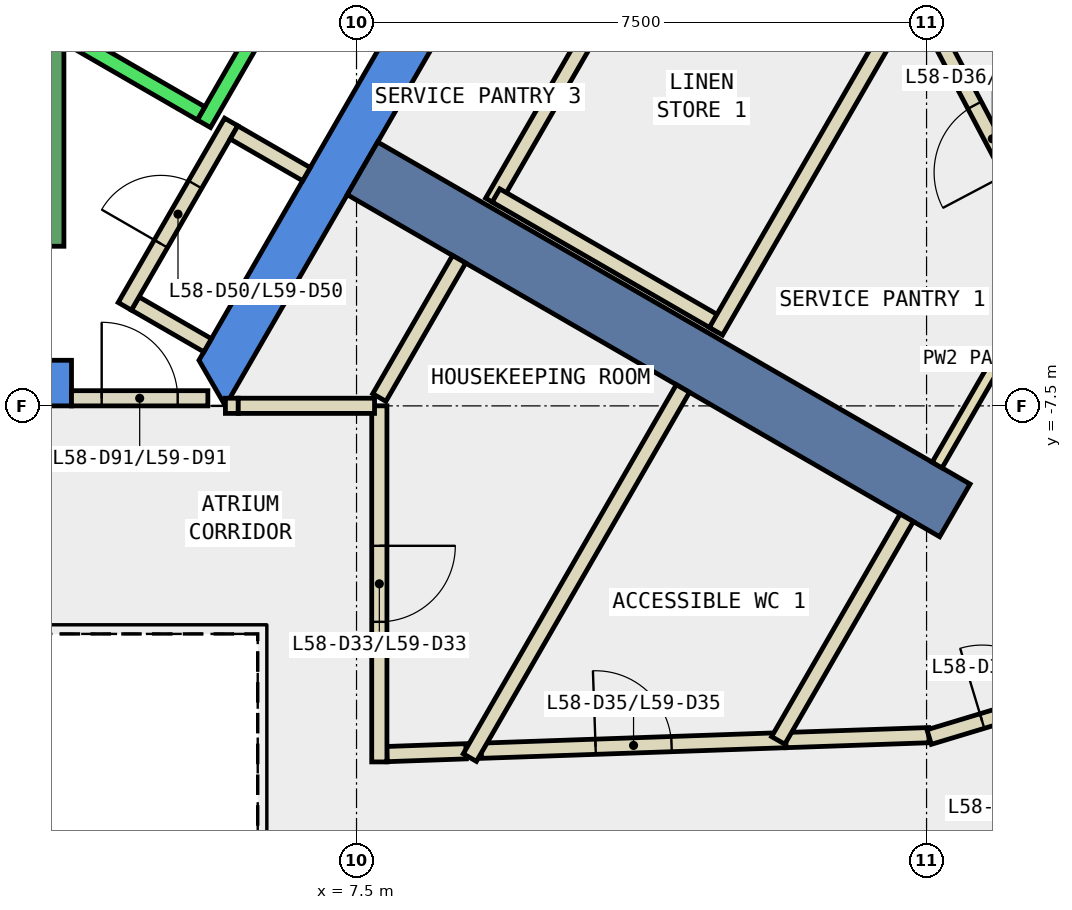
"""IFC4 building model, lengths in metres.
Left out: names, types, materials, properties, quantities, classifications, styles, units other than length and angle.
Written with IfcOpenShell. Run it as: python <this file> out.ifc"""

import sys

from ifc_helpers import new_model, si_unit, direction, frame, frame_2d, origin, place, context, subcontext, project, spatial, polyline, rectangle, outline, extrude, element, fill, save


model = new_model("IFC4")
c1 = context("Model", 3, precision=1e-05, world=origin(), true_north=direction((0.0, 1.0)))
c2 = subcontext(c1, "Body", "Model", "MODEL_VIEW")
j1 = project(units=[si_unit("LENGTHUNIT", "METRE"), si_unit("PLANEANGLEUNIT", "RADIAN")], contexts=[c1])
p1 = place(None, origin())
s1 = spatial("IfcSite", under=j1, at=p1, CompositionType="ELEMENT")
p2 = place(p1, origin())
s2 = spatial("IfcBuilding", under=s1, at=p2, CompositionType="ELEMENT")
p3 = place(p2, frame((0.0, 0.0, 255.8)))
s3 = spatial("IfcBuildingStorey", under=s2, at=p3, CompositionType="ELEMENT", Elevation=255.8)
p4 = place(p3, frame((0.0, 0.0, -0.34)))
e1 = element("IfcWall", 1, at=p4, inside=s3, PredefinedType="SHEAR", context=c2, shape_type="SweptSolid", body=[
    extrude(outline(polyline([(3.75, -7.5), (3.75, -6.9), (-5.427, -6.9), (-5.774, -7.5), (3.75, -7.5)])), origin(), (0.0, 0.0, 1.0), 3.6),
])
p5 = place(p3, frame((0.0, 0.0, -0.34)))
e2 = element("IfcWall", 2, at=p5, inside=s3, PredefinedType="SHEAR", context=c2, shape_type="SweptSolid", body=[
    extrude(outline(polyline([(5.774, -7.5), (11.547, 2.5), (10.854, 2.5), (5.427, -6.9), (5.774, -7.5)])), origin(), (0.0, 0.0, 1.0), 3.6),
])
p6 = place(p3, frame((7.578, -4.375, -0.34), z_axis=(0.0, 0.0, 1.0), x_axis=(0.866024315419, -0.5000018851, 0.0)))
e3 = element("IfcWall", 3, at=p6, inside=s3, PredefinedType="SHEAR", context=c2, shape_type="SweptSolid", body=[
    extrude(rectangle(XDim=9.0, YDim=0.8, at=frame_2d((4.5, 0.0))), origin(), (0.0, 0.0, 1.0), 3.6),
])
p7 = place(p3, frame((7.9, -12.081, 0.0), z_axis=(0.0, 0.0, 1.0), x_axis=(0.999365240621, 0.035624652105, 0.0)))
e4 = element("IfcWall", 4, at=p7, inside=s3, PredefinedType="PARTITIONING", context=c2, shape_type="SweptSolid", body=[
    extrude(rectangle(XDim=1.042, YDim=0.2, at=frame_2d((0.521, 0.0))), origin(), (0.0, 0.0, 1.0), 3.26),
])
p8 = place(p3, frame((9.141, -12.037, 0.0), z_axis=(0.0, 0.0, 1.0), x_axis=(0.999388955878, 0.034953038062, 0.0)))
e5 = element("IfcWall", 5, at=p8, inside=s3, PredefinedType="PARTITIONING", context=c2, shape_type="SweptSolid", body=[
    extrude(rectangle(XDim=4.009, YDim=0.2, at=frame_2d((2.005, 0.0))), origin(), (0.0, 0.0, 1.0), 3.26),
])
p9 = place(p8, frame((1.505, 0.0, 0.0)))
e6 = element("IfcOpeningElement", 6, at=p9, cuts=e5, PredefinedType="OPENING", context=c2, shape_type="SweptSolid", body=[
    extrude(rectangle(XDim=1.0, YDim=2.1, at=frame_2d((0.5, 1.05))), frame((0.0, 0.11, 0.0), z_axis=(0.0, -1.0, 0.0), x_axis=(1.0, 0.0, 0.0)), (0.0, 0.0, 1.0), 0.22),
])
p10 = place(p3, frame((16.667, -5.505, 0.0), z_axis=(0.0, 0.0, 1.0), x_axis=(-0.466812680399, 0.884356218624, 0.0)))
e7 = element("IfcWall", 7, at=p10, inside=s3, PredefinedType="PARTITIONING", context=c2, shape_type="SweptSolid", body=[
    extrude(rectangle(XDim=3.434, YDim=0.2, at=frame_2d((1.717, 0.0))), origin(), (0.0, 0.0, 1.0), 3.26),
])
p11 = place(p10, frame((1.217, 0.0, 0.0)))
e8 = element("IfcOpeningElement", 8, at=p11, cuts=e7, PredefinedType="OPENING", context=c2, shape_type="SweptSolid", body=[
    extrude(rectangle(XDim=1.0, YDim=2.1, at=frame_2d((0.5, 1.05))), frame((0.0, 0.11, 0.0), z_axis=(0.0, -1.0, 0.0), x_axis=(1.0, 0.0, 0.0)), (0.0, 0.0, 1.0), 0.22),
])
p12 = place(p3, frame((13.148, -11.897, 0.0), z_axis=(0.0, 0.0, 1.0), x_axis=(0.999405229262, 0.034484601243, 0.0)))
e9 = element("IfcWall", 9, at=p12, inside=s3, PredefinedType="PARTITIONING", context=c2, shape_type="SweptSolid", body=[
    extrude(rectangle(XDim=1.883, YDim=0.2, at=frame_2d((0.942, 0.0))), origin(), (0.0, 0.0, 1.0), 3.26),
])
p13 = place(p3, frame((15.034, -11.857, 0.0), z_axis=(0.0, 0.0, 1.0), x_axis=(0.957338084933, 0.288970225346, 0.0)))
e10 = element("IfcWall", 10, at=p13, inside=s3, PredefinedType="PARTITIONING", context=c2, shape_type="SweptSolid", body=[
    extrude(rectangle(XDim=2.457, YDim=0.2, at=frame_2d((1.229, 0.0))), origin(), (0.0, 0.0, 1.0), 3.26),
])
p14 = place(p13, frame((0.728, 0.0, 0.0)))
e11 = element("IfcOpeningElement", 11, at=p14, cuts=e10, PredefinedType="OPENING", context=c2, shape_type="SweptSolid", body=[
    extrude(rectangle(XDim=1.0, YDim=2.1, at=frame_2d((0.5, 1.05))), frame((0.0, 0.11, 0.0), z_axis=(0.0, -1.0, 0.0), x_axis=(1.0, 0.0, 0.0)), (0.0, 0.0, 1.0), 0.22),
])
p15 = place(p3, frame((18.427, -12.922, 0.0), z_axis=(0.0, 0.0, 1.0), x_axis=(-0.957336631432, -0.288975040651, 0.0)))
e12 = element("IfcWall", 12, at=p15, inside=s3, PredefinedType="PARTITIONING", context=c2, shape_type="SweptSolid", body=[
    extrude(rectangle(XDim=3.0, YDim=0.2, at=frame_2d((1.5, 0.0))), origin(), (0.0, 0.0, 1.0), 3.26),
])
p16 = place(p15, frame((1.0, 0.0, 0.0)))
e13 = element("IfcOpeningElement", 13, at=p16, cuts=e12, PredefinedType="OPENING", context=c2, shape_type="SweptSolid", body=[
    extrude(rectangle(XDim=1.0, YDim=2.1, at=frame_2d((0.5, 1.05))), frame((0.0, 0.11, 0.0), z_axis=(0.0, -1.0, 0.0), x_axis=(1.0, 0.0, 0.0)), (0.0, 0.0, 1.0), 0.22),
])
p17 = place(p3, frame((5.541, -6.703, 0.0), z_axis=(0.0, 0.0, 1.0), x_axis=(-0.86621513555, 0.499671230855, 0.0)))
e14 = element("IfcWall", 14, at=p17, inside=s3, PredefinedType="PARTITIONING", context=c2, shape_type="SweptSolid", body=[
    extrude(rectangle(XDim=1.1, YDim=0.2, at=frame_2d((0.55, 0.0))), origin(), (0.0, 0.0, 1.0), 3.26),
])
p18 = place(p3, frame((4.451, -6.19, 0.0), z_axis=(0.0, 0.0, 1.0), x_axis=(0.500011755427, 0.866018616679, 0.0)))
e15 = element("IfcWall", 15, at=p18, inside=s3, PredefinedType="PARTITIONING", context=c2, shape_type="SweptSolid", body=[
    extrude(rectangle(XDim=2.8, YDim=0.2, at=frame_2d((1.4, 0.0))), origin(), (0.0, 0.0, 1.0), 3.26),
])
p19 = place(p18, frame((0.95, 0.0, 0.0)))
e16 = element("IfcOpeningElement", 16, at=p19, cuts=e15, PredefinedType="OPENING", context=c2, shape_type="SweptSolid", body=[
    extrude(rectangle(XDim=0.9, YDim=2.1, at=frame_2d((0.45, 1.05))), frame((0.0, 0.11, 0.0), z_axis=(0.0, -1.0, 0.0), x_axis=(1.0, 0.0, 0.0)), (0.0, 0.0, 1.0), 0.22),
])
p20 = place(p3, frame((5.888, -3.902, 0.0), z_axis=(0.0, 0.0, 1.0), x_axis=(0.86621513555, -0.499671230855, 0.0)))
e17 = element("IfcWall", 17, at=p20, inside=s3, PredefinedType="PARTITIONING", context=c2, shape_type="SweptSolid", body=[
    extrude(rectangle(XDim=1.1, YDim=0.2, at=frame_2d((0.55, 0.0))), origin(), (0.0, 0.0, 1.0), 3.26),
])
p21 = place(p3, frame((5.775, -7.499, 0.0), z_axis=(0.0, 0.0, 1.0), x_axis=(1.0, 0.0, 0.0)))
e18 = element("IfcWall", 18, at=p21, inside=s3, PredefinedType="PARTITIONING", context=c2, shape_type="SweptSolid", body=[
    extrude(rectangle(XDim=0.169, YDim=0.2, at=frame_2d((0.084, 0.0))), origin(), (0.0, 0.0, 1.0), 2.4),
])
p22 = place(p3, frame((7.8, -7.39, 0.0), z_axis=(0.0, 0.0, 1.0), x_axis=(0.499977374825, 0.866038466041, 0.0)))
e19 = element("IfcWall", 19, at=p22, inside=s3, PredefinedType="PARTITIONING", context=c2, shape_type="SweptSolid", body=[
    extrude(rectangle(XDim=2.1, YDim=0.2, at=frame_2d((1.05, 0.0))), origin(), (0.0, 0.0, 1.0), 3.26),
])
p23 = place(p3, frame((9.285, -4.818, 0.0), z_axis=(0.0, 0.0, 1.0), x_axis=(0.499962569651, 0.866047013128, 0.0)))
e20 = element("IfcWall", 20, at=p23, inside=s3, PredefinedType="PARTITIONING", context=c2, shape_type="SweptSolid", body=[
    extrude(rectangle(XDim=7.334, YDim=0.2, at=frame_2d((3.667, 0.0))), origin(), (0.0, 0.0, 1.0), 3.26),
])
p24 = place(p3, frame((7.8, -7.499, 0.0), z_axis=(0.0, 0.0, 1.0), x_axis=(0.0, -1.0, 0.0)))
e21 = element("IfcWall", 21, at=p24, inside=s3, PredefinedType="PARTITIONING", context=c2, shape_type="SweptSolid", body=[
    extrude(rectangle(XDim=4.685, YDim=0.2, at=frame_2d((2.343, 0.0))), origin(), (0.0, 0.0, 1.0), 3.26),
])
p25 = place(p24, frame((1.842, 0.0, 0.0)))
e22 = element("IfcOpeningElement", 22, at=p25, cuts=e21, PredefinedType="OPENING", context=c2, shape_type="SweptSolid", body=[
    extrude(rectangle(XDim=1.0, YDim=2.1, at=frame_2d((0.5, 1.05))), frame((0.0, 0.11, 0.0), z_axis=(0.0, -1.0, 0.0), x_axis=(1.0, 0.0, 0.0)), (0.0, 0.0, 1.0), 0.22),
])
p26 = place(p3, frame((9.335, -4.732, 0.0), z_axis=(0.0, 0.0, 1.0), x_axis=(0.866002606077, -0.500039484709, 0.0)))
e23 = element("IfcWall", 23, at=p26, inside=s3, PredefinedType="PARTITIONING", context=c2, shape_type="SweptSolid", body=[
    extrude(rectangle(XDim=3.4, YDim=0.2, at=frame_2d((1.7, 0.0))), origin(), (0.0, 0.0, 1.0), 3.26),
])
p27 = place(p3, frame((11.794, -7.271, 0.0), z_axis=(0.0, 0.0, 1.0), x_axis=(-0.499918457185, -0.866072477433, 0.0)))
e24 = element("IfcWall", 24, at=p27, inside=s3, PredefinedType="PARTITIONING", context=c2, shape_type="SweptSolid", body=[
    extrude(rectangle(XDim=5.607, YDim=0.2, at=frame_2d((2.803, 0.0))), origin(), (0.0, 0.0, 1.0), 3.26),
])
p28 = place(p3, frame((14.871, -1.942, 0.0), z_axis=(0.0, 0.0, 1.0), x_axis=(-0.50000507839, -0.866022471755, 0.0)))
e25 = element("IfcWall", 25, at=p28, inside=s3, PredefinedType="PARTITIONING", context=c2, shape_type="SweptSolid", body=[
    extrude(rectangle(XDim=5.284, YDim=0.2, at=frame_2d((2.642, 0.0))), origin(), (0.0, 0.0, 1.0), 3.26),
])
p29 = place(p3, frame((14.739, -8.972, 0.0), z_axis=(0.0, 0.0, 1.0), x_axis=(-0.499974489635, -0.8660401317, 0.0)))
e26 = element("IfcWall", 26, at=p29, inside=s3, PredefinedType="PARTITIONING", context=c2, shape_type="SweptSolid", body=[
    extrude(rectangle(XDim=3.382, YDim=0.2, at=frame_2d((1.691, 0.0))), origin(), (0.0, 0.0, 1.0), 3.26),
])
p30 = place(p3, frame((16.752, -5.485, 0.0), z_axis=(0.0, 0.0, 1.0), x_axis=(-0.499988848364, -0.866031842089, 0.0)))
e27 = element("IfcWall", 27, at=p30, inside=s3, PredefinedType="PARTITIONING", context=c2, shape_type="SweptSolid", body=[
    extrude(rectangle(XDim=3.226, YDim=0.15, at=frame_2d((1.613, 0.0))), origin(), (0.0, 0.0, 1.0), 3.26),
])
p31 = place(p3, frame((3.75, -7.4, 0.0), z_axis=(0.0, 0.0, 1.0), x_axis=(1.0, 0.0, 0.0)))
e28 = element("IfcWall", 28, at=p31, inside=s3, PredefinedType="PARTITIONING", context=c2, shape_type="SweptSolid", body=[
    extrude(rectangle(XDim=1.794, YDim=0.2, at=frame_2d((0.897, 0.0))), origin(), (0.0, 0.0, 1.0), 2.4),
])
p32 = place(p31, frame((0.397, 0.0, 0.0)))
e29 = element("IfcOpeningElement", 29, at=p32, cuts=e28, PredefinedType="OPENING", context=c2, shape_type="SweptSolid", body=[
    extrude(rectangle(XDim=1.0, YDim=2.1, at=frame_2d((0.5, 1.05))), frame((0.0, 0.11, 0.0), z_axis=(0.0, -1.0, 0.0), x_axis=(1.0, 0.0, 0.0)), (0.0, 0.0, 1.0), 0.22),
])
p33 = place(p3, frame((5.944, -7.499, 0.0), z_axis=(0.0, 0.0, 1.0), x_axis=(1.0, 0.0, 0.0)))
e30 = element("IfcWall", 30, at=p33, inside=s3, PredefinedType="PARTITIONING", context=c2, shape_type="SweptSolid", body=[
    extrude(rectangle(XDim=1.793, YDim=0.2, at=frame_2d((0.896, 0.0))), origin(), (0.0, 0.0, 1.0), 3.26),
])
p34 = place(p3, frame((5.492, -3.788, 0.0), z_axis=(0.0, 0.0, 1.0), x_axis=(0.500034260056, 0.866005622828, 0.0)))
e31 = element("IfcWall", 31, at=p34, inside=s3, PredefinedType="STANDARD", context=c2, shape_type="SweptSolid", body=[
    extrude(rectangle(XDim=5.399, YDim=0.2, at=frame_2d((2.7, 0.0))), origin(), (0.0, 0.0, 1.0), 3.26),
])
p35 = place(p3, frame((3.377, -2.452, 0.0), z_axis=(0.0, 0.0, 1.0), x_axis=(0.865955154139, -0.50012165622, 0.0)))
e32 = element("IfcWall", 32, at=p35, inside=s3, PredefinedType="STANDARD", context=c2, shape_type="SweptSolid", body=[
    extrude(rectangle(XDim=2.4, YDim=0.2, at=frame_2d((1.2, 0.0))), origin(), (0.0, 0.0, 1.0), 3.26),
])
p36 = place(p3, frame((3.55, -2.667, 0.0), z_axis=(0.0, 0.0, 1.0), x_axis=(0.0, -1.0, 0.0)))
e33 = element("IfcWall", 33, at=p36, inside=s3, PredefinedType="STANDARD", context=c2, shape_type="SweptSolid", body=[
    extrude(rectangle(XDim=2.733, YDim=0.2, at=frame_2d((1.366, 0.0))), origin(), (0.0, 0.0, 1.0), 3.26),
])
p37 = place(p25, origin())
e34 = element("IfcDoor", 34, at=p37, inside=s3, OperationType="SINGLE_SWING_LEFT", PredefinedType="DOOR", context=c2, shape_type="SweptSolid", body=[
    extrude(rectangle(XDim=1.0, YDim=2.1, at=frame_2d((0.5, 1.05))), frame((0.0, 0.025, 0.0), z_axis=(0.0, -1.0, 0.0), x_axis=(1.0, 0.0, 0.0)), (0.0, 0.0, 1.0), 0.05),
])
fill(e22, e34)
p38 = place(p9, origin())
e35 = element("IfcDoor", 35, at=p38, inside=s3, OperationType="SINGLE_SWING_LEFT", PredefinedType="DOOR", context=c2, shape_type="SweptSolid", body=[
    extrude(rectangle(XDim=1.0, YDim=2.1, at=frame_2d((0.5, 1.05))), frame((0.0, 0.025, 0.0), z_axis=(0.0, -1.0, 0.0), x_axis=(1.0, 0.0, 0.0)), (0.0, 0.0, 1.0), 0.05),
])
fill(e6, e35)
p39 = place(p11, origin())
e36 = element("IfcDoor", 36, at=p39, inside=s3, OperationType="SINGLE_SWING_RIGHT", PredefinedType="DOOR", context=c2, shape_type="SweptSolid", body=[
    extrude(rectangle(XDim=1.0, YDim=2.1, at=frame_2d((0.5, 1.05))), frame((0.0, 0.025, 0.0), z_axis=(0.0, -1.0, 0.0), x_axis=(1.0, 0.0, 0.0)), (0.0, 0.0, 1.0), 0.05),
])
fill(e8, e36)
p40 = place(p14, origin())
e37 = element("IfcDoor", 37, at=p40, inside=s3, OperationType="SINGLE_SWING_LEFT", PredefinedType="DOOR", context=c2, shape_type="SweptSolid", body=[
    extrude(rectangle(XDim=1.0, YDim=2.1, at=frame_2d((0.5, 1.05))), frame((0.0, 0.025, 0.0), z_axis=(0.0, -1.0, 0.0), x_axis=(1.0, 0.0, 0.0)), (0.0, 0.0, 1.0), 0.05),
])
fill(e11, e37)
p41 = place(p19, origin())
e38 = element("IfcDoor", 38, at=p41, inside=s3, OperationType="SINGLE_SWING_LEFT", PredefinedType="DOOR", context=c2, shape_type="SweptSolid", body=[
    extrude(rectangle(XDim=0.9, YDim=2.1, at=frame_2d((0.45, 1.05))), frame((0.0, 0.025, 0.0), z_axis=(0.0, -1.0, 0.0), x_axis=(1.0, 0.0, 0.0)), (0.0, 0.0, 1.0), 0.05),
])
fill(e16, e38)
p42 = place(p32, origin())
e39 = element("IfcDoor", 39, at=p42, inside=s3, OperationType="SINGLE_SWING_LEFT", PredefinedType="DOOR", context=c2, shape_type="SweptSolid", body=[
    extrude(rectangle(XDim=1.0, YDim=2.1, at=frame_2d((0.5, 1.05))), frame((0.0, 0.025, 0.0), z_axis=(0.0, -1.0, 0.0), x_axis=(1.0, 0.0, 0.0)), (0.0, 0.0, 1.0), 0.05),
])
fill(e29, e39)
save(model, sys.argv[1])
